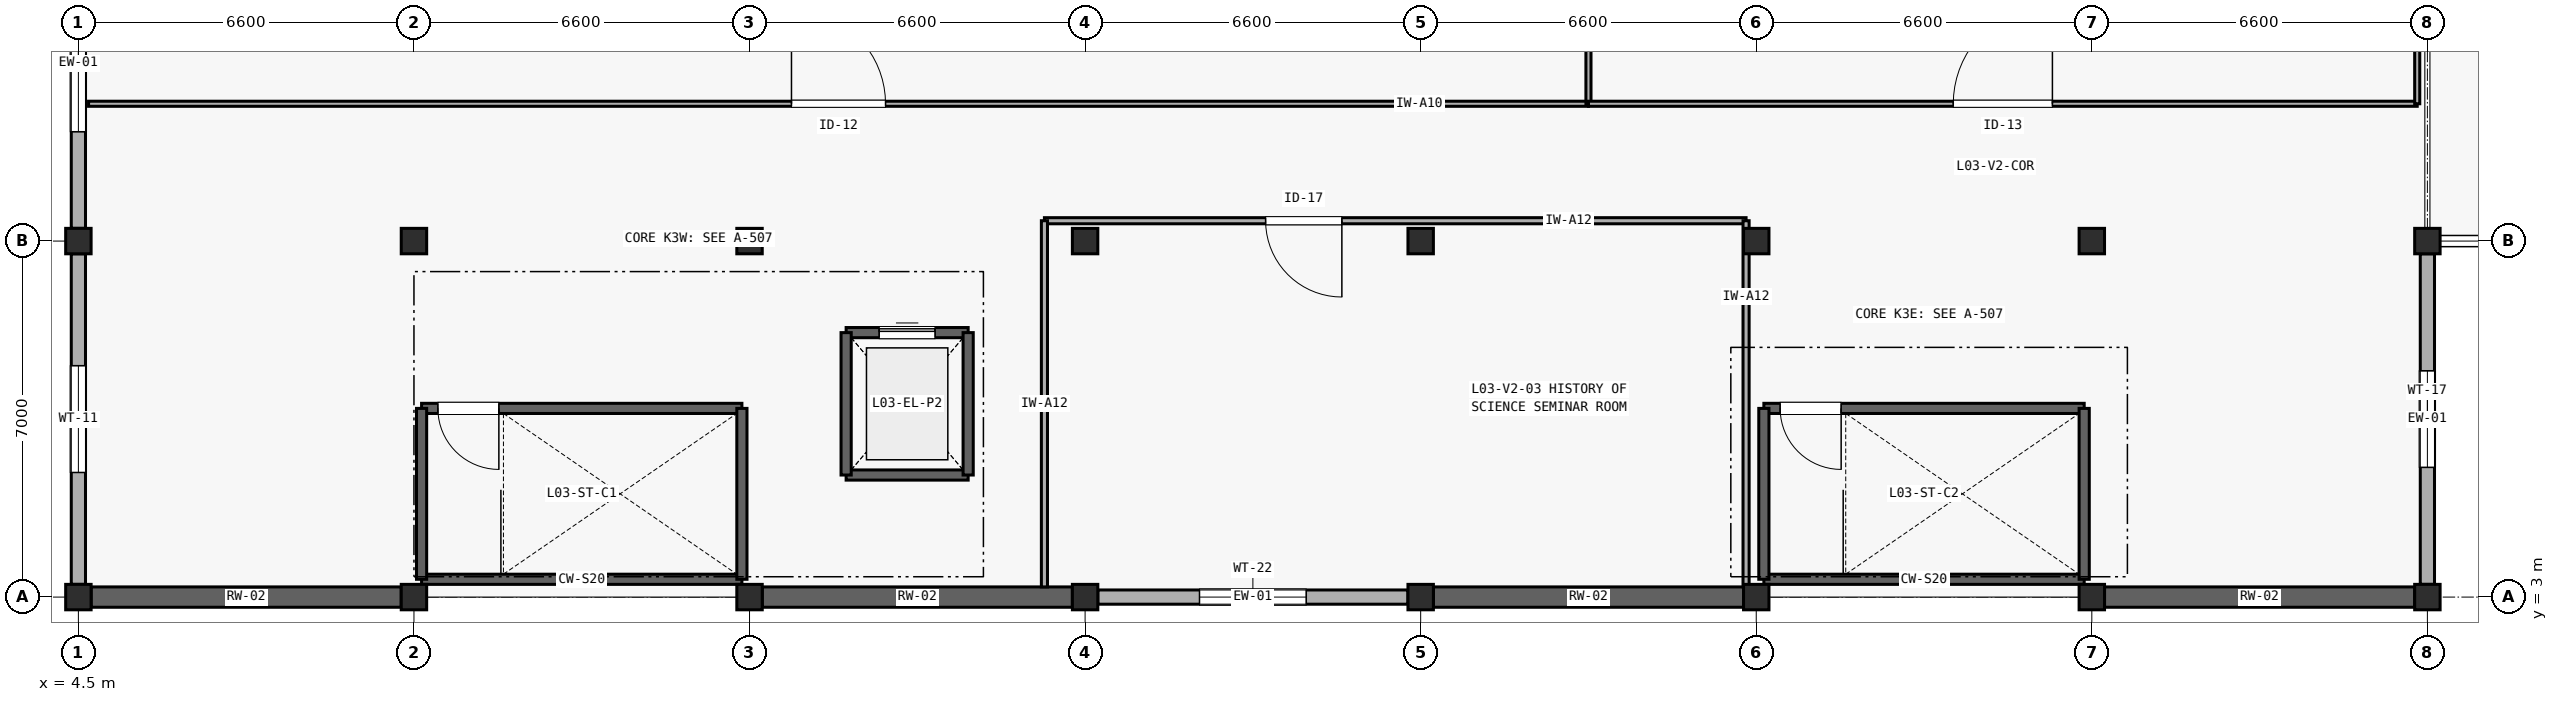
"""IFC4 building model, lengths in metres.
Left out: names, types, materials, properties, quantities, classifications, styles, units other than length and angle.
Written with IfcOpenShell. Run it as: python <this file> out.ifc"""

import sys

from ifc_helpers import new_model, si_unit, direction, frame, frame_2d, origin, origin_2d, place, context, subcontext, project, spatial, rectangle, extrude, element, fill, save


model = new_model("IFC4")
c1 = context("Model", 3, precision=1e-05, world=origin(), true_north=direction((0.0, 1.0)))
c2 = subcontext(c1, "Body", "Model", "MODEL_VIEW")
j1 = project(units=[si_unit("LENGTHUNIT", "METRE"), si_unit("PLANEANGLEUNIT", "RADIAN")], contexts=[c1])
p1 = place(None, origin())
s1 = spatial("IfcSite", under=j1, at=p1, CompositionType="ELEMENT")
p2 = place(p1, origin())
s2 = spatial("IfcBuilding", under=s1, at=p2, CompositionType="ELEMENT")
p3 = place(p2, frame((0.0, 0.0, 12.6)))
s3 = spatial("IfcBuildingStorey", under=s2, at=p3, CompositionType="ELEMENT", Elevation=12.6)
for number, where, z_axis, x_axis in (
    (1, (4.5, 3.0, 0.0), (0.0, 0.0, 1.0), (1.0, 0.0, 0.0)),
    (2, (4.5, 10.0, 0.0), (0.0, 0.0, 1.0), (1.0, 0.0, 0.0)),
    (3, (11.1, 3.0, 0.0), (0.0, 0.0, 1.0), (1.0, 0.0, 0.0)),
    (4, (11.1, 10.0, 0.0), (0.0, 0.0, 1.0), (1.0, 0.0, 0.0)),
    (5, (17.7, 3.0, 0.0), (0.0, 0.0, 1.0), (1.0, 0.0, 0.0)),
    (6, (17.7, 10.0, 0.0), (0.0, 0.0, 1.0), (1.0, 0.0, 0.0)),
    (7, (24.3, 3.0, 0.0), (0.0, 0.0, 1.0), (1.0, 0.0, 0.0)),
    (8, (24.3, 10.0, 0.0), (0.0, 0.0, 1.0), (1.0, 0.0, 0.0)),
    (9, (30.9, 3.0, 0.0), (0.0, 0.0, 1.0), (1.0, 0.0, 0.0)),
    (10, (30.9, 10.0, 0.0), (0.0, 0.0, 1.0), (1.0, 0.0, 0.0)),
    (11, (37.5, 3.0, 0.0), (0.0, 0.0, 1.0), (1.0, 0.0, 0.0)),
    (12, (37.5, 10.0, 0.0), (0.0, 0.0, 1.0), (1.0, 0.0, 0.0)),
    (13, (44.1, 3.0, 0.0), (0.0, 0.0, 1.0), (1.0, 0.0, 0.0)),
    (14, (44.1, 10.0, 0.0), (0.0, 0.0, 1.0), (1.0, 0.0, 0.0)),
    (15, (50.7, 3.0, 0.0), (0.0, 0.0, 1.0), (1.0, 0.0, 0.0)),
    (16, (50.7, 10.0, 0.0), (0.0, 0.0, 1.0), (1.0, 0.0, 0.0)),
):
    element("IfcColumn", number, at=place(p3, frame(where, z_axis=z_axis, x_axis=x_axis)), inside=s3, PredefinedType="COLUMN", context=c2, shape_type="SweptSolid", body=[
        extrude(rectangle(XDim=0.5, YDim=0.5, at=origin_2d()), origin(), (0.0, 0.0, 1.0), 4.2),
    ])
for number, where, z_axis, x_axis in (
    (17, (4.75, 3.0, 0.0), (0.0, 0.0, 1.0), (1.0, 0.0, 0.0)),
    (18, (17.95, 3.0, 0.0), (0.0, 0.0, 1.0), (1.0, 0.0, 0.0)),
):
    element("IfcWall", number, at=place(p3, frame(where, z_axis=z_axis, x_axis=x_axis)), inside=s3, PredefinedType="SHEAR", context=c2, shape_type="SweptSolid", body=[
        extrude(rectangle(XDim=6.1, YDim=0.4, at=frame_2d((3.05, 0.0))), origin(), (0.0, 0.0, 1.0), 3.85),
    ])
p4 = place(p3, frame((24.55, 3.0, 0.0), z_axis=(0.0, 0.0, 1.0), x_axis=(1.0, 0.0, 0.0)))
e19 = element("IfcWall", 19, at=p4, inside=s3, PredefinedType="SOLIDWALL", context=c2, shape_type="SweptSolid", body=[
    extrude(rectangle(XDim=6.1, YDim=0.28, at=frame_2d((3.05, 0.0))), origin(), (0.0, 0.0, 1.0), 3.365),
])
p5 = place(p4, frame((2.0, 0.0, 0.85)))
e20 = element("IfcOpeningElement", 20, at=p5, cuts=e19, PredefinedType="OPENING", context=c2, shape_type="SweptSolid", body=[
    extrude(rectangle(XDim=2.1, YDim=1.6, at=frame_2d((1.05, 0.8))), frame((0.0, 0.15, 0.0), z_axis=(0.0, -1.0, 0.0), x_axis=(1.0, 0.0, 0.0)), (0.0, 0.0, 1.0), 0.3),
])
p6 = place(p3, frame((31.15, 3.0, 0.0), z_axis=(0.0, 0.0, 1.0), x_axis=(1.0, 0.0, 0.0)))
e21 = element("IfcWall", 21, at=p6, inside=s3, PredefinedType="SHEAR", context=c2, shape_type="SweptSolid", body=[
    extrude(rectangle(XDim=6.1, YDim=0.4, at=frame_2d((3.05, 0.0))), origin(), (0.0, 0.0, 1.0), 3.85),
])
p7 = place(p3, frame((44.35, 3.0, 0.0), z_axis=(0.0, 0.0, 1.0), x_axis=(1.0, 0.0, 0.0)))
e22 = element("IfcWall", 22, at=p7, inside=s3, PredefinedType="SHEAR", context=c2, shape_type="SweptSolid", body=[
    extrude(rectangle(XDim=6.1, YDim=0.4, at=frame_2d((3.05, 0.0))), origin(), (0.0, 0.0, 1.0), 3.85),
])
p8 = place(p3, frame((4.5, 3.25, 0.0), z_axis=(0.0, 0.0, 1.0), x_axis=(0.0, 1.0, 0.0)))
e23 = element("IfcWall", 23, at=p8, inside=s3, PredefinedType="SOLIDWALL", context=c2, shape_type="SweptSolid", body=[
    extrude(rectangle(XDim=6.5, YDim=0.28, at=frame_2d((3.25, 0.0))), origin(), (0.0, 0.0, 1.0), 3.365),
])
p9 = place(p8, frame((2.2, 0.0, 0.85)))
e24 = element("IfcOpeningElement", 24, at=p9, cuts=e23, PredefinedType="OPENING", context=c2, shape_type="SweptSolid", body=[
    extrude(rectangle(XDim=2.1, YDim=1.5, at=frame_2d((1.05, 0.75))), frame((0.0, 0.15, 0.0), z_axis=(0.0, -1.0, 0.0), x_axis=(1.0, 0.0, 0.0)), (0.0, 0.0, 1.0), 0.3),
])
p10 = place(p3, frame((4.5, 10.25, 0.0), z_axis=(0.0, 0.0, 1.0), x_axis=(0.0, 1.0, 0.0)))
e25 = element("IfcWall", 25, at=p10, inside=s3, PredefinedType="SOLIDWALL", context=c2, shape_type="SweptSolid", body=[
    extrude(rectangle(XDim=6.5, YDim=0.28, at=frame_2d((3.25, 0.0))), origin(), (0.0, 0.0, 1.0), 3.365),
])
p11 = place(p10, frame((1.9, 0.0, 0.85)))
e26 = element("IfcOpeningElement", 26, at=p11, cuts=e25, PredefinedType="OPENING", context=c2, shape_type="SweptSolid", body=[
    extrude(rectangle(XDim=2.7, YDim=1.5, at=frame_2d((1.35, 0.75))), frame((0.0, 0.15, 0.0), z_axis=(0.0, -1.0, 0.0), x_axis=(1.0, 0.0, 0.0)), (0.0, 0.0, 1.0), 0.3),
])
p12 = place(p3, frame((50.7, 3.25, 0.0), z_axis=(0.0, 0.0, 1.0), x_axis=(0.0, 1.0, 0.0)))
e27 = element("IfcWall", 27, at=p12, inside=s3, PredefinedType="SOLIDWALL", context=c2, shape_type="SweptSolid", body=[
    extrude(rectangle(XDim=6.5, YDim=0.28, at=frame_2d((3.25, 0.0))), origin(), (0.0, 0.0, 1.0), 3.365),
])
p13 = place(p12, frame((2.3, 0.0, 0.85)))
e28 = element("IfcOpeningElement", 28, at=p13, cuts=e27, PredefinedType="OPENING", context=c2, shape_type="SweptSolid", body=[
    extrude(rectangle(XDim=1.9, YDim=1.25, at=frame_2d((0.95, 0.625))), frame((0.0, 0.15, 0.0), z_axis=(0.0, -1.0, 0.0), x_axis=(1.0, 0.0, 0.0)), (0.0, 0.0, 1.0), 0.3),
])
p14 = place(p3, frame((11.25, 3.35, 0.0), z_axis=(0.0, 0.0, 1.0), x_axis=(1.0, 0.0, 0.0)))
e29 = element("IfcWall", 29, at=p14, inside=s3, PredefinedType="SHEAR", context=c2, shape_type="SweptSolid", body=[
    extrude(rectangle(XDim=6.3, YDim=0.2, at=frame_2d((3.15, 0.0))), origin(), (0.0, 0.0, 1.0), 4.2),
])
p15 = place(p3, frame((11.25, 6.71, 0.0), z_axis=(0.0, 0.0, 1.0), x_axis=(1.0, 0.0, 0.0)))
e30 = element("IfcWall", 30, at=p15, inside=s3, PredefinedType="SHEAR", context=c2, shape_type="SweptSolid", body=[
    extrude(rectangle(XDim=6.3, YDim=0.2, at=frame_2d((3.15, 0.0))), origin(), (0.0, 0.0, 1.0), 4.2),
])
p16 = place(p15, frame((0.32, 0.0, 0.0)))
e31 = element("IfcOpeningElement", 31, at=p16, cuts=e30, PredefinedType="OPENING", context=c2, shape_type="SweptSolid", body=[
    extrude(rectangle(XDim=1.2, YDim=2.15, at=frame_2d((0.6, 1.075))), frame((0.0, 0.11, 0.0), z_axis=(0.0, -1.0, 0.0), x_axis=(1.0, 0.0, 0.0)), (0.0, 0.0, 1.0), 0.22),
])
for number, where, z_axis, x_axis in (
    (32, (11.25, 3.35, 0.0), (0.0, 0.0, 1.0), (0.0, 1.0, 0.0)),
    (33, (17.55, 3.35, 0.0), (0.0, 0.0, 1.0), (0.0, 1.0, 0.0)),
):
    element("IfcWall", number, at=place(p3, frame(where, z_axis=z_axis, x_axis=x_axis)), inside=s3, PredefinedType="SHEAR", context=c2, shape_type="SweptSolid", body=[
        extrude(rectangle(XDim=3.36, YDim=0.2, at=frame_2d((1.68, 0.0))), origin(), (0.0, 0.0, 1.0), 4.2),
    ])
p17 = place(p3, frame((37.65, 3.35, 0.0), z_axis=(0.0, 0.0, 1.0), x_axis=(1.0, 0.0, 0.0)))
e34 = element("IfcWall", 34, at=p17, inside=s3, PredefinedType="SHEAR", context=c2, shape_type="SweptSolid", body=[
    extrude(rectangle(XDim=6.3, YDim=0.2, at=frame_2d((3.15, 0.0))), origin(), (0.0, 0.0, 1.0), 4.2),
])
p18 = place(p3, frame((37.65, 6.71, 0.0), z_axis=(0.0, 0.0, 1.0), x_axis=(1.0, 0.0, 0.0)))
e35 = element("IfcWall", 35, at=p18, inside=s3, PredefinedType="SHEAR", context=c2, shape_type="SweptSolid", body=[
    extrude(rectangle(XDim=6.3, YDim=0.2, at=frame_2d((3.15, 0.0))), origin(), (0.0, 0.0, 1.0), 4.2),
])
p19 = place(p18, frame((0.32, 0.0, 0.0)))
e36 = element("IfcOpeningElement", 36, at=p19, cuts=e35, PredefinedType="OPENING", context=c2, shape_type="SweptSolid", body=[
    extrude(rectangle(XDim=1.2, YDim=2.15, at=frame_2d((0.6, 1.075))), frame((0.0, 0.11, 0.0), z_axis=(0.0, -1.0, 0.0), x_axis=(1.0, 0.0, 0.0)), (0.0, 0.0, 1.0), 0.22),
])
for number, where, z_axis, x_axis in (
    (37, (37.65, 3.35, 0.0), (0.0, 0.0, 1.0), (0.0, 1.0, 0.0)),
    (38, (43.95, 3.35, 0.0), (0.0, 0.0, 1.0), (0.0, 1.0, 0.0)),
):
    element("IfcWall", number, at=place(p3, frame(where, z_axis=z_axis, x_axis=x_axis)), inside=s3, PredefinedType="SHEAR", context=c2, shape_type="SweptSolid", body=[
        extrude(rectangle(XDim=3.36, YDim=0.2, at=frame_2d((1.68, 0.0))), origin(), (0.0, 0.0, 1.0), 4.2),
    ])
p20 = place(p3, frame((19.6, 5.4, 0.0), z_axis=(0.0, 0.0, 1.0), x_axis=(1.0, 0.0, 0.0)))
e39 = element("IfcWall", 39, at=p20, inside=s3, PredefinedType="SHEAR", context=c2, shape_type="SweptSolid", body=[
    extrude(rectangle(XDim=2.4, YDim=0.2, at=frame_2d((1.2, 0.0))), origin(), (0.0, 0.0, 1.0), 4.2),
])
p21 = place(p3, frame((19.6, 8.2, 0.0), z_axis=(0.0, 0.0, 1.0), x_axis=(1.0, 0.0, 0.0)))
e40 = element("IfcWall", 40, at=p21, inside=s3, PredefinedType="SHEAR", context=c2, shape_type="SweptSolid", body=[
    extrude(rectangle(XDim=2.4, YDim=0.2, at=frame_2d((1.2, 0.0))), origin(), (0.0, 0.0, 1.0), 4.2),
])
p22 = place(p21, frame((0.65, 0.0, 0.0)))
e41 = element("IfcOpeningElement", 41, at=p22, cuts=e40, PredefinedType="OPENING", context=c2, shape_type="SweptSolid", body=[
    extrude(rectangle(XDim=1.1, YDim=2.15, at=frame_2d((0.55, 1.075))), frame((0.0, 0.11, 0.0), z_axis=(0.0, -1.0, 0.0), x_axis=(1.0, 0.0, 0.0)), (0.0, 0.0, 1.0), 0.22),
])
for number, where, z_axis, x_axis in (
    (42, (19.6, 5.4, 0.0), (0.0, 0.0, 1.0), (0.0, 1.0, 0.0)),
    (43, (22.0, 5.4, 0.0), (0.0, 0.0, 1.0), (0.0, 1.0, 0.0)),
):
    element("IfcWall", number, at=place(p3, frame(where, z_axis=z_axis, x_axis=x_axis)), inside=s3, PredefinedType="SHEAR", context=c2, shape_type="SweptSolid", body=[
        extrude(rectangle(XDim=2.8, YDim=0.2, at=frame_2d((1.4, 0.0))), origin(), (0.0, 0.0, 1.0), 4.2),
    ])
p23 = place(p3, frame((4.7, 12.7, 0.0), z_axis=(0.0, 0.0, 1.0), x_axis=(1.0, 0.0, 0.0)))
e44 = element("IfcWall", 44, at=p23, inside=s3, PredefinedType="PARTITIONING", context=c2, shape_type="SweptSolid", body=[
    extrude(rectangle(XDim=29.5, YDim=0.1, at=frame_2d((14.75, 0.0))), origin(), (0.0, 0.0, 1.0), 3.9),
])
p24 = place(p23, frame((13.825, 0.0, 0.0)))
e45 = element("IfcOpeningElement", 45, at=p24, cuts=e44, PredefinedType="OPENING", context=c2, shape_type="SweptSolid", body=[
    extrude(rectangle(XDim=1.85, YDim=2.3, at=frame_2d((0.925, 1.15))), frame((0.0, 0.06, 0.0), z_axis=(0.0, -1.0, 0.0), x_axis=(1.0, 0.0, 0.0)), (0.0, 0.0, 1.0), 0.12),
])
p25 = place(p3, frame((34.2, 12.7, 0.0), z_axis=(0.0, 0.0, 1.0), x_axis=(0.0, 1.0, 0.0)))
e46 = element("IfcWall", 46, at=p25, inside=s3, PredefinedType="PARTITIONING", context=c2, shape_type="SweptSolid", body=[
    extrude(rectangle(XDim=11.1, YDim=0.1, at=frame_2d((5.55, 0.0))), origin(), (0.0, 0.0, 1.0), 3.9),
])
p26 = place(p3, frame((34.2, 12.7, 0.0), z_axis=(0.0, 0.0, 1.0), x_axis=(1.0, 0.0, 0.0)))
e47 = element("IfcWall", 47, at=p26, inside=s3, PredefinedType="PARTITIONING", context=c2, shape_type="SweptSolid", body=[
    extrude(rectangle(XDim=16.3, YDim=0.1, at=frame_2d((8.15, 0.0))), origin(), (0.0, 0.0, 1.0), 3.9),
])
p27 = place(p26, frame((7.175, 0.0, 0.0)))
e48 = element("IfcOpeningElement", 48, at=p27, cuts=e47, PredefinedType="OPENING", context=c2, shape_type="SweptSolid", body=[
    extrude(rectangle(XDim=1.95, YDim=2.3, at=frame_2d((0.975, 1.15))), frame((0.0, 0.06, 0.0), z_axis=(0.0, -1.0, 0.0), x_axis=(1.0, 0.0, 0.0)), (0.0, 0.0, 1.0), 0.12),
])
p28 = place(p3, frame((50.5, 12.7, 0.0), z_axis=(0.0, 0.0, 1.0), x_axis=(0.0, 1.0, 0.0)))
e49 = element("IfcWall", 49, at=p28, inside=s3, PredefinedType="PARTITIONING", context=c2, shape_type="SweptSolid", body=[
    extrude(rectangle(XDim=11.1, YDim=0.1, at=frame_2d((5.55, 0.0))), origin(), (0.0, 0.0, 1.0), 3.365),
])
p29 = place(p3, frame((23.5, 10.4, 0.0), z_axis=(0.0, 0.0, 1.0), x_axis=(1.0, 0.0, 0.0)))
e50 = element("IfcWall", 50, at=p29, inside=s3, PredefinedType="PARTITIONING", context=c2, shape_type="SweptSolid", body=[
    extrude(rectangle(XDim=13.8, YDim=0.12, at=frame_2d((6.9, 0.0))), origin(), (0.0, 0.0, 1.0), 3.9),
])
p30 = place(p29, frame((4.35, 0.0, 0.0)))
e51 = element("IfcOpeningElement", 51, at=p30, cuts=e50, PredefinedType="OPENING", context=c2, shape_type="SweptSolid", body=[
    extrude(rectangle(XDim=1.5, YDim=2.15, at=frame_2d((0.75, 1.075))), frame((0.0, 0.07, 0.0), z_axis=(0.0, -1.0, 0.0), x_axis=(1.0, 0.0, 0.0)), (0.0, 0.0, 1.0), 0.14),
])
p31 = place(p3, frame((23.5, 3.2, 0.0), z_axis=(0.0, 0.0, 1.0), x_axis=(0.0, 1.0, 0.0)))
e52 = element("IfcWall", 52, at=p31, inside=s3, PredefinedType="PARTITIONING", context=c2, shape_type="SweptSolid", body=[
    extrude(rectangle(XDim=7.2, YDim=0.12, at=frame_2d((3.6, 0.0))), origin(), (0.0, 0.0, 1.0), 3.9),
])
p32 = place(p3, frame((37.3, 3.2, 0.0), z_axis=(0.0, 0.0, 1.0), x_axis=(0.0, 1.0, 0.0)))
e53 = element("IfcWall", 53, at=p32, inside=s3, PredefinedType="PARTITIONING", context=c2, shape_type="SweptSolid", body=[
    extrude(rectangle(XDim=7.2, YDim=0.12, at=frame_2d((3.6, 0.0))), origin(), (0.0, 0.0, 1.0), 3.365),
])
p33 = place(p5, origin())
e54 = element("IfcWindow", 54, at=p33, inside=s3, PartitioningType="SINGLE_PANEL", PredefinedType="WINDOW", context=c2, shape_type="SweptSolid", body=[
    extrude(rectangle(XDim=2.1, YDim=1.6, at=frame_2d((1.05, 0.8))), frame((0.0, 0.03, 0.0), z_axis=(0.0, -1.0, 0.0), x_axis=(1.0, 0.0, 0.0)), (0.0, 0.0, 1.0), 0.06),
])
fill(e20, e54)
p34 = place(p9, origin())
e55 = element("IfcWindow", 55, at=p34, inside=s3, PartitioningType="SINGLE_PANEL", PredefinedType="WINDOW", context=c2, shape_type="SweptSolid", body=[
    extrude(rectangle(XDim=2.1, YDim=1.5, at=frame_2d((1.05, 0.75))), frame((0.0, 0.03, 0.0), z_axis=(0.0, -1.0, 0.0), x_axis=(1.0, 0.0, 0.0)), (0.0, 0.0, 1.0), 0.06),
])
fill(e24, e55)
p35 = place(p11, origin())
e56 = element("IfcWindow", 56, at=p35, inside=s3, PartitioningType="SINGLE_PANEL", PredefinedType="WINDOW", context=c2, shape_type="SweptSolid", body=[
    extrude(rectangle(XDim=2.7, YDim=1.5, at=frame_2d((1.35, 0.75))), frame((0.0, 0.03, 0.0), z_axis=(0.0, -1.0, 0.0), x_axis=(1.0, 0.0, 0.0)), (0.0, 0.0, 1.0), 0.06),
])
fill(e26, e56)
p36 = place(p13, origin())
e57 = element("IfcWindow", 57, at=p36, inside=s3, PartitioningType="SINGLE_PANEL", PredefinedType="WINDOW", context=c2, shape_type="SweptSolid", body=[
    extrude(rectangle(XDim=1.9, YDim=1.25, at=frame_2d((0.95, 0.625))), frame((0.0, 0.03, 0.0), z_axis=(0.0, -1.0, 0.0), x_axis=(1.0, 0.0, 0.0)), (0.0, 0.0, 1.0), 0.06),
])
fill(e28, e57)
p37 = place(p16, frame((1.2, 0.0, 0.0), z_axis=(0.0, 0.0, 1.0), x_axis=(-1.0, 0.0, 0.0)))
e58 = element("IfcDoor", 58, at=p37, inside=s3, OperationType="SINGLE_SWING_LEFT", PredefinedType="DOOR", context=c2, shape_type="SweptSolid", body=[
    extrude(rectangle(XDim=1.2, YDim=2.15, at=frame_2d((0.6, 1.075))), frame((0.0, 0.025, 0.0), z_axis=(0.0, -1.0, 0.0), x_axis=(1.0, 0.0, 0.0)), (0.0, 0.0, 1.0), 0.05),
])
fill(e31, e58)
p38 = place(p19, frame((1.2, 0.0, 0.0), z_axis=(0.0, 0.0, 1.0), x_axis=(-1.0, 0.0, 0.0)))
e59 = element("IfcDoor", 59, at=p38, inside=s3, OperationType="SINGLE_SWING_LEFT", PredefinedType="DOOR", context=c2, shape_type="SweptSolid", body=[
    extrude(rectangle(XDim=1.2, YDim=2.15, at=frame_2d((0.6, 1.075))), frame((0.0, 0.025, 0.0), z_axis=(0.0, -1.0, 0.0), x_axis=(1.0, 0.0, 0.0)), (0.0, 0.0, 1.0), 0.05),
])
fill(e36, e59)
p39 = place(p22, origin())
e60 = element("IfcDoor", 60, at=p39, inside=s3, OperationType="SLIDING_TO_LEFT", PredefinedType="DOOR", context=c2, shape_type="SweptSolid", body=[
    extrude(rectangle(XDim=1.1, YDim=2.15, at=frame_2d((0.55, 1.075))), frame((0.0, 0.025, 0.0), z_axis=(0.0, -1.0, 0.0), x_axis=(1.0, 0.0, 0.0)), (0.0, 0.0, 1.0), 0.05),
])
fill(e41, e60)
p40 = place(p24, origin())
e61 = element("IfcDoor", 61, at=p40, inside=s3, OperationType="SINGLE_SWING_LEFT", PredefinedType="DOOR", context=c2, shape_type="SweptSolid", body=[
    extrude(rectangle(XDim=1.85, YDim=2.3, at=frame_2d((0.925, 1.15))), frame((0.0, 0.025, 0.0), z_axis=(0.0, -1.0, 0.0), x_axis=(1.0, 0.0, 0.0)), (0.0, 0.0, 1.0), 0.05),
])
fill(e45, e61)
p41 = place(p27, origin())
e62 = element("IfcDoor", 62, at=p41, inside=s3, OperationType="SINGLE_SWING_RIGHT", PredefinedType="DOOR", context=c2, shape_type="SweptSolid", body=[
    extrude(rectangle(XDim=1.95, YDim=2.3, at=frame_2d((0.975, 1.15))), frame((0.0, 0.025, 0.0), z_axis=(0.0, -1.0, 0.0), x_axis=(1.0, 0.0, 0.0)), (0.0, 0.0, 1.0), 0.05),
])
fill(e48, e62)
p42 = place(p30, frame((1.5, 0.0, 0.0), z_axis=(0.0, 0.0, 1.0), x_axis=(-1.0, 0.0, 0.0)))
e63 = element("IfcDoor", 63, at=p42, inside=s3, OperationType="SINGLE_SWING_LEFT", PredefinedType="DOOR", context=c2, shape_type="SweptSolid", body=[
    extrude(rectangle(XDim=1.5, YDim=2.15, at=frame_2d((0.75, 1.075))), frame((0.0, 0.025, 0.0), z_axis=(0.0, -1.0, 0.0), x_axis=(1.0, 0.0, 0.0)), (0.0, 0.0, 1.0), 0.05),
])
fill(e51, e63)
save(model, sys.argv[1])
